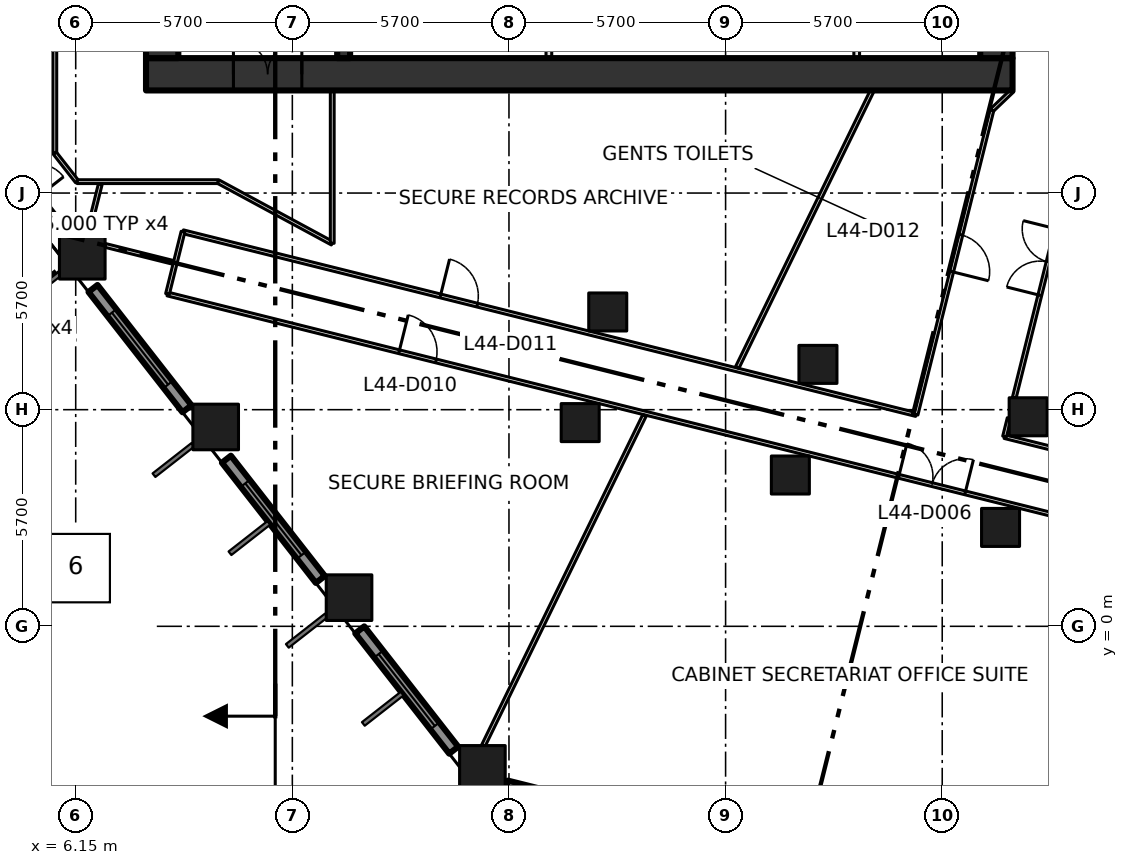
"""IFC4 building model, lengths in metres.
Left out: names, types, materials, properties, quantities, classifications, styles, units other than length and angle.
Written with IfcOpenShell. Run it as: python <this file> out.ifc"""

import sys

from ifc_helpers import new_model, si_unit, direction, frame, frame_2d, origin, origin_2d, place, context, subcontext, project, spatial, rectangle, extrude, element, fill, save


model = new_model("IFC4")
c1 = context("Model", 3, precision=1e-05, world=origin(), true_north=direction((0.0, 1.0)))
c2 = subcontext(c1, "Body", "Model", "MODEL_VIEW")
j1 = project(units=[si_unit("LENGTHUNIT", "METRE"), si_unit("PLANEANGLEUNIT", "RADIAN")], contexts=[c1])
p1 = place(None, origin())
s1 = spatial("IfcSite", under=j1, at=p1, CompositionType="ELEMENT")
p2 = place(p1, origin())
s2 = spatial("IfcBuilding", under=s1, at=p2, CompositionType="ELEMENT")
p3 = place(p2, frame((0.0, 0.0, 195.0)))
s3 = spatial("IfcBuildingStorey", under=s2, at=p3, CompositionType="ELEMENT", Elevation=195.0)
for number, where, z_axis, x_axis in (
    (1, (16.851, -3.738, 0.0), (0.0, 0.0, 1.0), (1.0, 0.0, 0.0)),
    (2, (13.342, 0.754, 0.0), (0.0, 0.0, 1.0), (1.0, 0.0, 0.0)),
    (3, (9.833, 5.245, 0.0), (0.0, 0.0, 1.0), (1.0, 0.0, 0.0)),
    (4, (6.323, 9.737, 0.0), (0.0, 0.0, 1.0), (1.0, 0.0, 0.0)),
):
    element("IfcColumn", number, at=place(p3, frame(where, z_axis=z_axis, x_axis=x_axis)), inside=s3, PredefinedType="COLUMN", context=c2, shape_type="SweptSolid", body=[
        extrude(rectangle(XDim=1.2, YDim=1.2, at=origin_2d()), origin(), (0.0, 0.0, 1.0), 4.2),
    ])
for number, where, z_axis, x_axis in (
    (5, (19.424, 5.36, 0.0), (0.0, 0.0, 1.0), (1.0, 0.0, 0.0)),
    (6, (24.954, 3.981, 0.0), (0.0, 0.0, 1.0), (1.0, 0.0, 0.0)),
    (7, (30.485, 2.602, 0.0), (0.0, 0.0, 1.0), (1.0, 0.0, 0.0)),
    (8, (20.149, 8.271, 0.0), (0.0, 0.0, 1.0), (1.0, 0.0, 0.0)),
    (9, (25.68, 6.892, 0.0), (0.0, 0.0, 1.0), (1.0, 0.0, 0.0)),
    (10, (31.211, 5.513, 0.0), (0.0, 0.0, 1.0), (1.0, 0.0, 0.0)),
):
    element("IfcColumn", number, at=place(p3, frame(where, z_axis=z_axis, x_axis=x_axis)), inside=s3, PredefinedType="COLUMN", context=c2, shape_type="SweptSolid", body=[
        extrude(rectangle(XDim=1.0, YDim=1.0, at=origin_2d()), origin(), (0.0, 0.0, 1.0), 4.2),
    ])
p4 = place(p3, frame((8.0, 14.525, -0.3), z_axis=(0.0, 0.0, 1.0), x_axis=(1.0, 0.0, 0.0)))
e11 = element("IfcWall", 11, at=p4, inside=s3, PredefinedType="SHEAR", context=c2, shape_type="SweptSolid", body=[
    extrude(rectangle(XDim=22.8, YDim=0.85, at=frame_2d((11.4, 0.0))), origin(), (0.0, 0.0, 1.0), 4.2),
])
p5 = place(p4, frame((2.3, 0.0, 0.3)))
e12 = element("IfcOpeningElement", 12, at=p5, cuts=e11, PredefinedType="OPENING", context=c2, shape_type="SweptSolid", body=[
    extrude(rectangle(XDim=1.8, YDim=2.1, at=frame_2d((0.9, 1.05))), frame((0.0, 0.435, 0.0), z_axis=(0.0, -1.0, 0.0), x_axis=(1.0, 0.0, 0.0)), (0.0, 0.0, 1.0), 0.87),
])
for number, where, z_axis, x_axis in (
    (13, (8.425, 14.95, -0.3), (0.0, 0.0, 1.0), (0.0, 1.0, 0.0)),
    (14, (30.375, 14.95, -0.3), (0.0, 0.0, 1.0), (0.0, 1.0, 0.0)),
):
    element("IfcWall", number, at=place(p3, frame(where, z_axis=z_axis, x_axis=x_axis)), inside=s3, PredefinedType="SHEAR", context=c2, shape_type="SweptSolid", body=[
        extrude(rectangle(XDim=20.75, YDim=0.85, at=frame_2d((10.375, 0.0))), origin(), (0.0, 0.0, 1.0), 4.2),
    ])
p6 = place(p3, frame((13.2, 14.95, 0.0), z_axis=(0.0, 0.0, 1.0), x_axis=(0.0, 1.0, 0.0)))
e15 = element("IfcWall", 15, at=p6, inside=s3, PredefinedType="SHEAR", context=c2, shape_type="SweptSolid", body=[
    extrude(rectangle(XDim=20.75, YDim=0.34, at=frame_2d((10.375, 0.0))), origin(), (0.0, 0.0, 1.0), 3.9),
])
p7 = place(p6, frame((3.35, 0.0, 0.0)))
e16 = element("IfcOpeningElement", 16, at=p7, cuts=e15, PredefinedType="OPENING", context=c2, shape_type="SweptSolid", body=[
    extrude(rectangle(XDim=1.8, YDim=2.1, at=frame_2d((0.9, 1.05))), frame((0.0, 0.18, 0.0), z_axis=(0.0, -1.0, 0.0), x_axis=(1.0, 0.0, 0.0)), (0.0, 0.0, 1.0), 0.36),
])
p8 = place(p6, frame((11.45, 0.0, 0.0)))
e17 = element("IfcOpeningElement", 17, at=p8, cuts=e15, PredefinedType="OPENING", context=c2, shape_type="SweptSolid", body=[
    extrude(rectangle(XDim=1.2, YDim=2.1, at=frame_2d((0.6, 1.05))), frame((0.0, 0.18, 0.0), z_axis=(0.0, -1.0, 0.0), x_axis=(1.0, 0.0, 0.0)), (0.0, 0.0, 1.0), 0.36),
])
for number, where, z_axis, x_axis in (
    (18, (18.6, 14.95, 0.0), (0.0, 0.0, 1.0), (0.0, 1.0, 0.0)),
    (19, (26.7, 14.95, 0.0), (0.0, 0.0, 1.0), (0.0, 1.0, 0.0)),
):
    element("IfcWall", number, at=place(p3, frame(where, z_axis=z_axis, x_axis=x_axis)), inside=s3, PredefinedType="PARTITIONING", context=c2, shape_type="SweptSolid", body=[
        extrude(rectangle(XDim=2.675, YDim=0.15, at=frame_2d((1.337, 0.0))), origin(), (0.0, 0.0, 1.0), 3.9),
    ])
p9 = place(p3, frame((3.283, 13.629, 0.0), z_axis=(0.0, 0.0, 1.0), x_axis=(0.615666723149, -0.78800665353, 0.0)))
e20 = element("IfcWall", 20, at=p9, inside=s3, PredefinedType="SOLIDWALL", context=c2, shape_type="SweptSolid", body=[
    extrude(rectangle(XDim=4.178, YDim=0.2, at=frame_2d((2.089, 0.0))), origin(), (0.0, 0.0, 1.0), 3.15),
])
p10 = place(p9, frame((1.188, 0.0, 0.0)))
e21 = element("IfcOpeningElement", 21, at=p10, cuts=e20, PredefinedType="OPENING", context=c2, shape_type="SweptSolid", body=[
    extrude(rectangle(XDim=1.8, YDim=2.9, at=frame_2d((0.9, 1.45))), frame((0.0, 0.11, 0.0), z_axis=(0.0, -1.0, 0.0), x_axis=(1.0, 0.0, 0.0)), (0.0, 0.0, 1.0), 0.22),
])
p11 = place(p3, frame((6.605, 8.889, 0.0), z_axis=(0.0, 0.0, 1.0), x_axis=(0.615706559089, -0.787975528233, 0.0)))
e22 = element("IfcWall", 22, at=p11, inside=s3, PredefinedType="SOLIDWALL", context=c2, shape_type="SweptSolid", body=[
    extrude(rectangle(XDim=4.016, YDim=0.3, at=frame_2d((2.008, 0.0))), origin(), (0.0, 0.0, 1.0), 3.15),
])
p12 = place(p11, frame((0.808, 0.0, 0.8)))
e23 = element("IfcOpeningElement", 23, at=p12, cuts=e22, PredefinedType="OPENING", context=c2, shape_type="SweptSolid", body=[
    extrude(rectangle(XDim=2.4, YDim=2.1, at=frame_2d((1.2, 1.05))), frame((0.0, 0.16, 0.0), z_axis=(0.0, -1.0, 0.0), x_axis=(1.0, 0.0, 0.0)), (0.0, 0.0, 1.0), 0.32),
])
p13 = place(p3, frame((10.115, 4.397, 0.0), z_axis=(0.0, 0.0, 1.0), x_axis=(0.615644041972, -0.788024373725, 0.0)))
e24 = element("IfcWall", 24, at=p13, inside=s3, PredefinedType="SOLIDWALL", context=c2, shape_type="SweptSolid", body=[
    extrude(rectangle(XDim=4.015, YDim=0.3, at=frame_2d((2.008, 0.0))), origin(), (0.0, 0.0, 1.0), 3.15),
])
p14 = place(p13, frame((0.807, 0.0, 0.8)))
e25 = element("IfcOpeningElement", 25, at=p14, cuts=e24, PredefinedType="OPENING", context=c2, shape_type="SweptSolid", body=[
    extrude(rectangle(XDim=2.4, YDim=2.1, at=frame_2d((1.2, 1.05))), frame((0.0, 0.16, 0.0), z_axis=(0.0, -1.0, 0.0), x_axis=(1.0, 0.0, 0.0)), (0.0, 0.0, 1.0), 0.32),
])
p15 = place(p3, frame((13.624, -0.094, 0.0), z_axis=(0.0, 0.0, 1.0), x_axis=(0.615526062586, -0.7881165309, 0.0)))
e26 = element("IfcWall", 26, at=p15, inside=s3, PredefinedType="SOLIDWALL", context=c2, shape_type="SweptSolid", body=[
    extrude(rectangle(XDim=4.016, YDim=0.3, at=frame_2d((2.008, 0.0))), origin(), (0.0, 0.0, 1.0), 3.15),
])
p16 = place(p15, frame((0.808, 0.0, 0.8)))
e27 = element("IfcOpeningElement", 27, at=p16, cuts=e26, PredefinedType="OPENING", context=c2, shape_type="SweptSolid", body=[
    extrude(rectangle(XDim=2.4, YDim=2.1, at=frame_2d((1.2, 1.05))), frame((0.0, 0.16, 0.0), z_axis=(0.0, -1.0, 0.0), x_axis=(1.0, 0.0, 0.0)), (0.0, 0.0, 1.0), 0.32),
])
p17 = place(p3, frame((17.484, -4.205, 0.0), z_axis=(0.0, 0.0, 1.0), x_axis=(0.970318118028, -0.241832069473, 0.0)))
e28 = element("IfcWall", 28, at=p17, inside=s3, PredefinedType="SOLIDWALL", context=c2, shape_type="SweptSolid", body=[
    extrude(rectangle(XDim=4.246, YDim=0.3, at=frame_2d((2.123, 0.0))), origin(), (0.0, 0.0, 1.0), 3.15),
])
p18 = place(p17, frame((0.923, 0.0, 0.8)))
e29 = element("IfcOpeningElement", 29, at=p18, cuts=e28, PredefinedType="OPENING", context=c2, shape_type="SweptSolid", body=[
    extrude(rectangle(XDim=2.4, YDim=2.1, at=frame_2d((1.2, 1.05))), frame((0.0, 0.16, 0.0), z_axis=(0.0, -1.0, 0.0), x_axis=(1.0, 0.0, 0.0)), (0.0, 0.0, 1.0), 0.32),
])
p19 = place(p3, frame((5.6, 12.451, 0.0), z_axis=(0.0, 0.0, 1.0), x_axis=(0.0, 1.0, 0.0)))
e30 = element("IfcWall", 30, at=p19, inside=s3, PredefinedType="PARTITIONING", context=c2, shape_type="SweptSolid", body=[
    extrude(rectangle(XDim=26.699, YDim=0.1, at=frame_2d((13.35, 0.0))), origin(), (0.0, 0.0, 1.0), 3.9),
])
p20 = place(p19, frame((7.17, 0.0, 0.0)))
e31 = element("IfcOpeningElement", 31, at=p20, cuts=e30, PredefinedType="OPENING", context=c2, shape_type="SweptSolid", body=[
    extrude(rectangle(XDim=1.0, YDim=2.1, at=frame_2d((0.5, 1.05))), frame((0.0, 0.06, 0.0), z_axis=(0.0, -1.0, 0.0), x_axis=(1.0, 0.0, 0.0)), (0.0, 0.0, 1.0), 0.12),
])
p21 = place(p19, frame((20.569, 0.0, 0.0)))
e32 = element("IfcOpeningElement", 32, at=p21, cuts=e30, PredefinedType="OPENING", context=c2, shape_type="SweptSolid", body=[
    extrude(rectangle(XDim=1.0, YDim=2.1, at=frame_2d((0.5, 1.05))), frame((0.0, 0.06, 0.0), z_axis=(0.0, -1.0, 0.0), x_axis=(1.0, 0.0, 0.0)), (0.0, 0.0, 1.0), 0.12),
])
p22 = place(p19, frame((24.979, 0.0, 0.0)))
e33 = element("IfcOpeningElement", 33, at=p22, cuts=e30, PredefinedType="OPENING", context=c2, shape_type="SweptSolid", body=[
    extrude(rectangle(XDim=1.0, YDim=2.1, at=frame_2d((0.5, 1.05))), frame((0.0, 0.06, 0.0), z_axis=(0.0, -1.0, 0.0), x_axis=(1.0, 0.0, 0.0)), (0.0, 0.0, 1.0), 0.12),
])
p23 = place(p3, frame((5.6, 12.451, 0.0), z_axis=(0.0, 0.0, 1.0), x_axis=(0.615783213621, -0.787915626081, 0.0)))
e34 = element("IfcWall", 34, at=p23, inside=s3, PredefinedType="PARTITIONING", context=c2, shape_type="SweptSolid", body=[
    extrude(rectangle(XDim=0.953, YDim=0.1, at=frame_2d((0.477, 0.0))), origin(), (0.0, 0.0, 1.0), 3.9),
])
p24 = place(p3, frame((6.187, 11.7, 0.0), z_axis=(0.0, 0.0, 1.0), x_axis=(1.0, 0.0, 0.0)))
e35 = element("IfcWall", 35, at=p24, inside=s3, PredefinedType="PARTITIONING", context=c2, shape_type="SweptSolid", body=[
    extrude(rectangle(XDim=3.713, YDim=0.1, at=frame_2d((1.856, 0.0))), origin(), (0.0, 0.0, 1.0), 3.9),
])
p25 = place(p3, frame((8.565, 8.744, 0.0), z_axis=(0.0, 0.0, 1.0), x_axis=(0.97029693432, -0.24191705035, 0.0)))
e36 = element("IfcWall", 36, at=p25, inside=s3, PredefinedType="PARTITIONING", context=c2, shape_type="SweptSolid", body=[
    extrude(rectangle(XDim=56.375, YDim=0.1, at=frame_2d((28.187, 0.0))), origin(), (0.0, 0.0, 1.0), 3.9),
])
p26 = place(p25, frame((37.03, 0.0, 0.0)))
e37 = element("IfcOpeningElement", 37, at=p26, cuts=e36, PredefinedType="OPENING", context=c2, shape_type="SweptSolid", body=[
    extrude(rectangle(XDim=1.8, YDim=2.1, at=frame_2d((0.9, 1.05))), frame((0.0, 0.06, 0.0), z_axis=(0.0, -1.0, 0.0), x_axis=(1.0, 0.0, 0.0)), (0.0, 0.0, 1.0), 0.12),
])
p27 = place(p25, frame((42.83, 0.0, 0.0)))
e38 = element("IfcOpeningElement", 38, at=p27, cuts=e36, PredefinedType="OPENING", context=c2, shape_type="SweptSolid", body=[
    extrude(rectangle(XDim=1.0, YDim=2.1, at=frame_2d((0.5, 1.05))), frame((0.0, 0.06, 0.0), z_axis=(0.0, -1.0, 0.0), x_axis=(1.0, 0.0, 0.0)), (0.0, 0.0, 1.0), 0.12),
])
p28 = place(p25, frame((19.831, 0.0, 0.0)))
e39 = element("IfcOpeningElement", 39, at=p28, cuts=e36, PredefinedType="OPENING", context=c2, shape_type="SweptSolid", body=[
    extrude(rectangle(XDim=1.8, YDim=2.1, at=frame_2d((0.9, 1.05))), frame((0.0, 0.06, 0.0), z_axis=(0.0, -1.0, 0.0), x_axis=(1.0, 0.0, 0.0)), (0.0, 0.0, 1.0), 0.12),
])
p29 = place(p25, frame((25.631, 0.0, 0.0)))
e40 = element("IfcOpeningElement", 40, at=p29, cuts=e36, PredefinedType="OPENING", context=c2, shape_type="SweptSolid", body=[
    extrude(rectangle(XDim=1.0, YDim=2.1, at=frame_2d((0.5, 1.05))), frame((0.0, 0.06, 0.0), z_axis=(0.0, -1.0, 0.0), x_axis=(1.0, 0.0, 0.0)), (0.0, 0.0, 1.0), 0.12),
])
p30 = place(p25, frame((6.28, 0.0, 0.0)))
e41 = element("IfcOpeningElement", 41, at=p30, cuts=e36, PredefinedType="OPENING", context=c2, shape_type="SweptSolid", body=[
    extrude(rectangle(XDim=1.0, YDim=2.1, at=frame_2d((0.5, 1.05))), frame((0.0, 0.06, 0.0), z_axis=(0.0, -1.0, 0.0), x_axis=(1.0, 0.0, 0.0)), (0.0, 0.0, 1.0), 0.12),
])
p31 = place(p3, frame((8.973, 10.382, 0.0), z_axis=(0.0, 0.0, 1.0), x_axis=(0.970286808807, -0.241957658808, 0.0)))
e42 = element("IfcWall", 42, at=p31, inside=s3, PredefinedType="PARTITIONING", context=c2, shape_type="SweptSolid", body=[
    extrude(rectangle(XDim=19.88, YDim=0.1, at=frame_2d((9.94, 0.0))), origin(), (0.0, 0.0, 1.0), 3.9),
])
p32 = place(p31, frame((6.98, 0.0, 0.0)))
e43 = element("IfcOpeningElement", 43, at=p32, cuts=e42, PredefinedType="OPENING", context=c2, shape_type="SweptSolid", body=[
    extrude(rectangle(XDim=1.0, YDim=2.1, at=frame_2d((0.5, 1.05))), frame((0.0, 0.06, 0.0), z_axis=(0.0, -1.0, 0.0), x_axis=(1.0, 0.0, 0.0)), (0.0, 0.0, 1.0), 0.12),
])
p33 = place(p3, frame((8.973, 10.382, 0.0), z_axis=(0.0, 0.0, 1.0), x_axis=(-0.241650823739, -0.970363271866, 0.0)))
e44 = element("IfcWall", 44, at=p33, inside=s3, PredefinedType="PARTITIONING", context=c2, shape_type="SweptSolid", body=[
    extrude(rectangle(XDim=1.688, YDim=0.1, at=frame_2d((0.844, 0.0))), origin(), (0.0, 0.0, 1.0), 3.9),
])
p34 = place(p3, frame((9.9, 11.7, 0.0), z_axis=(0.0, 0.0, 1.0), x_axis=(0.87965147249, -0.475618846291, 0.0)))
e45 = element("IfcWall", 45, at=p34, inside=s3, PredefinedType="PARTITIONING", context=c2, shape_type="SweptSolid", body=[
    extrude(rectangle(XDim=3.41, YDim=0.1, at=frame_2d((1.705, 0.0))), origin(), (0.0, 0.0, 1.0), 3.9),
])
p35 = place(p3, frame((12.9, 10.078, 0.0), z_axis=(0.0, 0.0, 1.0), x_axis=(0.0, 1.0, 0.0)))
e46 = element("IfcWall", 46, at=p35, inside=s3, PredefinedType="PARTITIONING", context=c2, shape_type="SweptSolid", body=[
    extrude(rectangle(XDim=4.022, YDim=0.1, at=frame_2d((2.011, 0.0))), origin(), (0.0, 0.0, 1.0), 3.9),
])
p36 = place(p3, frame((30.259, 13.583, 0.0), z_axis=(0.0, 0.0, 1.0), x_axis=(-0.241888494143, -0.970304053584, 0.0)))
e47 = element("IfcWall", 47, at=p36, inside=s3, PredefinedType="PARTITIONING", context=c2, shape_type="SweptSolid", body=[
    extrude(rectangle(XDim=8.256, YDim=0.1, at=frame_2d((4.128, 0.0))), origin(), (0.0, 0.0, 1.0), 3.9),
])
p37 = place(p36, frame((3.38, 0.0, 0.0)))
e48 = element("IfcOpeningElement", 48, at=p37, cuts=e47, PredefinedType="OPENING", context=c2, shape_type="SweptSolid", body=[
    extrude(rectangle(XDim=1.0, YDim=2.1, at=frame_2d((0.5, 1.05))), frame((0.0, 0.06, 0.0), z_axis=(0.0, -1.0, 0.0), x_axis=(1.0, 0.0, 0.0)), (0.0, 0.0, 1.0), 0.12),
])
p38 = place(p3, frame((30.59, 4.992, 0.0), z_axis=(0.0, 0.0, 1.0), x_axis=(0.97028916255, -0.241948219746, 0.0)))
e49 = element("IfcWall", 49, at=p38, inside=s3, PredefinedType="PARTITIONING", context=c2, shape_type="SweptSolid", body=[
    extrude(rectangle(XDim=25.526, YDim=0.1, at=frame_2d((12.763, 0.0))), origin(), (0.0, 0.0, 1.0), 3.9),
])
p39 = place(p38, frame((20.101, 0.0, 0.0)))
e50 = element("IfcOpeningElement", 50, at=p39, cuts=e49, PredefinedType="OPENING", context=c2, shape_type="SweptSolid", body=[
    extrude(rectangle(XDim=1.0, YDim=2.1, at=frame_2d((0.5, 1.05))), frame((0.0, 0.06, 0.0), z_axis=(0.0, -1.0, 0.0), x_axis=(1.0, 0.0, 0.0)), (0.0, 0.0, 1.0), 0.12),
])
p40 = place(p3, frame((30.59, 4.992, 0.0), z_axis=(0.0, 0.0, 1.0), x_axis=(0.241731207299, 0.970343250308, 0.0)))
e51 = element("IfcWall", 51, at=p40, inside=s3, PredefinedType="PARTITIONING", context=c2, shape_type="SweptSolid", body=[
    extrude(rectangle(XDim=0.5, YDim=0.1, at=frame_2d((0.25, 0.0))), origin(), (0.0, 0.0, 1.0), 3.9),
])
p41 = place(p3, frame((30.8, 14.1, 0.0), z_axis=(0.0, 0.0, 1.0), x_axis=(-0.722911025189, -0.690941133281, 0.0)))
e52 = element("IfcWall", 52, at=p41, inside=s3, PredefinedType="PARTITIONING", context=c2, shape_type="SweptSolid", body=[
    extrude(rectangle(XDim=0.748, YDim=0.1, at=frame_2d((0.374, 0.0))), origin(), (0.0, 0.0, 1.0), 3.9),
])
p42 = place(p3, frame((30.845, 6.013, 0.0), z_axis=(0.0, 0.0, 1.0), x_axis=(0.241969354343, 0.97028389225, 0.0)))
e53 = element("IfcWall", 53, at=p42, inside=s3, PredefinedType="PARTITIONING", context=c2, shape_type="SweptSolid", body=[
    extrude(rectangle(XDim=7.203, YDim=0.1, at=frame_2d((3.602, 0.0))), origin(), (0.0, 0.0, 1.0), 3.9),
])
p43 = place(p42, frame((2.78, 0.0, 0.0)))
e54 = element("IfcOpeningElement", 54, at=p43, cuts=e53, PredefinedType="OPENING", context=c2, shape_type="SweptSolid", body=[
    extrude(rectangle(XDim=1.8, YDim=2.1, at=frame_2d((0.9, 1.05))), frame((0.0, 0.06, 0.0), z_axis=(0.0, -1.0, 0.0), x_axis=(1.0, 0.0, 0.0)), (0.0, 0.0, 1.0), 0.12),
])
p44 = place(p3, frame((6.797, 11.638, 0.0), z_axis=(0.0, 0.0, 1.0), x_axis=(-0.242492789119, -0.97015320812, 0.0)))
e55 = element("IfcWall", 55, at=p44, inside=s3, PredefinedType="PARTITIONING", context=c2, shape_type="SweptSolid", body=[
    extrude(rectangle(XDim=1.341, YDim=0.1, at=frame_2d((0.67, 0.0))), origin(), (0.0, 0.0, 1.0), 3.9),
])
p45 = place(p3, frame((8.72, 9.574, 0.0), z_axis=(0.0, 0.0, 1.0), x_axis=(-0.97017350799, 0.242411559945, 0.0)))
e56 = element("IfcWall", 56, at=p45, inside=s3, PredefinedType="PARTITIONING", context=c2, shape_type="SweptSolid", body=[
    extrude(rectangle(XDim=1.852, YDim=0.1, at=frame_2d((0.926, 0.0))), origin(), (0.0, 0.0, 1.0), 3.9),
])
p46 = place(p3, frame((16.877, -3.138, 0.0), z_axis=(0.0, 0.0, 1.0), x_axis=(0.438466907108, 0.898747334556, 0.0)))
e57 = element("IfcWall", 57, at=p46, inside=s3, PredefinedType="PARTITIONING", context=c2, shape_type="SweptSolid", body=[
    extrude(rectangle(XDim=9.67, YDim=0.1, at=frame_2d((4.835, 0.0))), origin(), (0.0, 0.0, 1.0), 3.9),
])
p47 = place(p3, frame((23.555, 6.808, 0.0), z_axis=(0.0, 0.0, 1.0), x_axis=(0.438332324522, 0.898812980146, 0.0)))
e58 = element("IfcWall", 58, at=p47, inside=s3, PredefinedType="PARTITIONING", context=c2, shape_type="SweptSolid", body=[
    extrude(rectangle(XDim=8.113, YDim=0.1, at=frame_2d((4.056, 0.0))), origin(), (0.0, 0.0, 1.0), 3.9),
])
p48 = place(p5, origin())
e59 = element("IfcDoor", 59, at=p48, inside=s3, OperationType="DOUBLE_DOOR_SINGLE_SWING", PredefinedType="DOOR", context=c2, shape_type="SweptSolid", body=[
    extrude(rectangle(XDim=1.8, YDim=2.1, at=frame_2d((0.9, 1.05))), frame((0.0, 0.025, 0.0), z_axis=(0.0, -1.0, 0.0), x_axis=(1.0, 0.0, 0.0)), (0.0, 0.0, 1.0), 0.05),
])
fill(e12, e59)
p49 = place(p12, origin())
e60 = element("IfcWindow", 60, at=p49, inside=s3, PartitioningType="DOUBLE_PANEL_VERTICAL", PredefinedType="WINDOW", context=c2, shape_type="SweptSolid", body=[
    extrude(rectangle(XDim=2.4, YDim=2.1, at=frame_2d((1.2, 1.05))), frame((0.0, 0.03, 0.0), z_axis=(0.0, -1.0, 0.0), x_axis=(1.0, 0.0, 0.0)), (0.0, 0.0, 1.0), 0.06),
])
fill(e23, e60)
p50 = place(p14, origin())
e61 = element("IfcWindow", 61, at=p50, inside=s3, PartitioningType="DOUBLE_PANEL_VERTICAL", PredefinedType="WINDOW", context=c2, shape_type="SweptSolid", body=[
    extrude(rectangle(XDim=2.4, YDim=2.1, at=frame_2d((1.2, 1.05))), frame((0.0, 0.03, 0.0), z_axis=(0.0, -1.0, 0.0), x_axis=(1.0, 0.0, 0.0)), (0.0, 0.0, 1.0), 0.06),
])
fill(e25, e61)
p51 = place(p16, origin())
e62 = element("IfcWindow", 62, at=p51, inside=s3, PartitioningType="DOUBLE_PANEL_VERTICAL", PredefinedType="WINDOW", context=c2, shape_type="SweptSolid", body=[
    extrude(rectangle(XDim=2.4, YDim=2.1, at=frame_2d((1.2, 1.05))), frame((0.0, 0.03, 0.0), z_axis=(0.0, -1.0, 0.0), x_axis=(1.0, 0.0, 0.0)), (0.0, 0.0, 1.0), 0.06),
])
fill(e27, e62)
p52 = place(p28, origin())
e63 = element("IfcDoor", 63, at=p52, inside=s3, OperationType="DOUBLE_DOOR_SINGLE_SWING", PredefinedType="DOOR", context=c2, shape_type="SweptSolid", body=[
    extrude(rectangle(XDim=1.8, YDim=2.1, at=frame_2d((0.9, 1.05))), frame((0.0, 0.025, 0.0), z_axis=(0.0, -1.0, 0.0), x_axis=(1.0, 0.0, 0.0)), (0.0, 0.0, 1.0), 0.05),
])
fill(e39, e63)
p53 = place(p30, origin())
e64 = element("IfcDoor", 64, at=p53, inside=s3, OperationType="SINGLE_SWING_LEFT", PredefinedType="DOOR", context=c2, shape_type="SweptSolid", body=[
    extrude(rectangle(XDim=1.0, YDim=2.1, at=frame_2d((0.5, 1.05))), frame((0.0, 0.025, 0.0), z_axis=(0.0, -1.0, 0.0), x_axis=(1.0, 0.0, 0.0)), (0.0, 0.0, 1.0), 0.05),
])
fill(e41, e64)
p54 = place(p32, origin())
e65 = element("IfcDoor", 65, at=p54, inside=s3, OperationType="SINGLE_SWING_LEFT", PredefinedType="DOOR", context=c2, shape_type="SweptSolid", body=[
    extrude(rectangle(XDim=1.0, YDim=2.1, at=frame_2d((0.5, 1.05))), frame((0.0, 0.025, 0.0), z_axis=(0.0, -1.0, 0.0), x_axis=(1.0, 0.0, 0.0)), (0.0, 0.0, 1.0), 0.05),
])
fill(e43, e65)
p55 = place(p37, origin())
e66 = element("IfcDoor", 66, at=p55, inside=s3, OperationType="SINGLE_SWING_RIGHT", PredefinedType="DOOR", context=c2, shape_type="SweptSolid", body=[
    extrude(rectangle(XDim=1.0, YDim=2.1, at=frame_2d((0.5, 1.05))), frame((0.0, 0.025, 0.0), z_axis=(0.0, -1.0, 0.0), x_axis=(1.0, 0.0, 0.0)), (0.0, 0.0, 1.0), 0.05),
])
fill(e48, e66)
p56 = place(p43, origin())
e67 = element("IfcDoor", 67, at=p56, inside=s3, OperationType="DOUBLE_DOOR_SINGLE_SWING", PredefinedType="DOOR", context=c2, shape_type="SweptSolid", body=[
    extrude(rectangle(XDim=1.8, YDim=2.1, at=frame_2d((0.9, 1.05))), frame((0.0, 0.025, 0.0), z_axis=(0.0, -1.0, 0.0), x_axis=(1.0, 0.0, 0.0)), (0.0, 0.0, 1.0), 0.05),
])
fill(e54, e67)
save(model, sys.argv[1])
